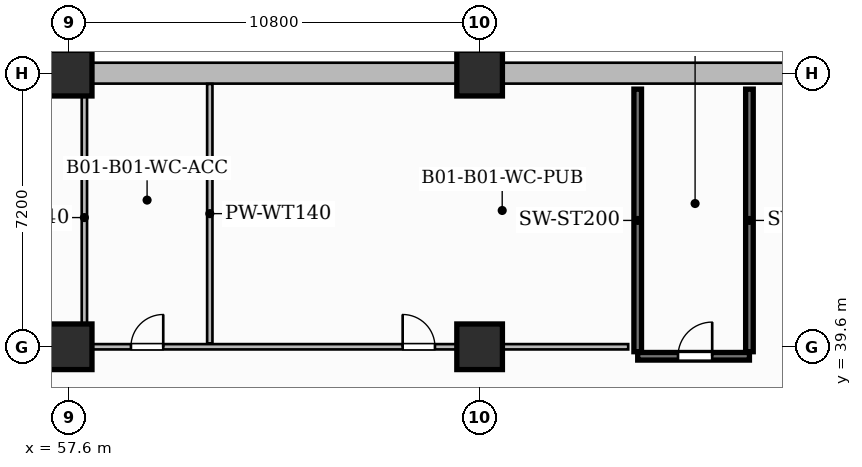
"""IFC4 building model, lengths in metres.
Left out: names, types, materials, properties, quantities, classifications, styles, units other than length and angle.
Written with IfcOpenShell. Run it as: python <this file> out.ifc"""

import sys

from ifc_helpers import new_model, si_unit, direction, frame, frame_2d, origin, origin_2d, place, context, subcontext, project, spatial, rectangle, extrude, source, transform, mapped, element, fill, save


model = new_model("IFC4")
c1 = context("Model", 3, precision=1e-05, world=origin(), true_north=direction((0.0, 1.0)))
c2 = subcontext(c1, "Body", "Model", "MODEL_VIEW")
j1 = project(units=[si_unit("LENGTHUNIT", "METRE"), si_unit("PLANEANGLEUNIT", "RADIAN")], contexts=[c1])
p1 = place(None, origin())
s1 = spatial("IfcSite", under=j1, at=p1, CompositionType="ELEMENT")
p2 = place(p1, origin())
s2 = spatial("IfcBuilding", under=s1, at=p2, CompositionType="ELEMENT")
p3 = place(p2, frame((0.0, 0.0, -6.5)))
s3 = spatial("IfcBuildingStorey", under=s2, at=p3, CompositionType="ELEMENT", Elevation=-6.5)
p4 = place(p3, frame((80.4, 46.8, 0.0), z_axis=(0.0, 0.0, 1.0), x_axis=(-1.0, 0.0, 0.0)))
e1 = element("IfcWall", 1, at=p4, inside=s3, PredefinedType="USERDEFINED", context=c2, shape_type="SweptSolid", body=[
    extrude(rectangle(XDim=85.2, YDim=0.55, at=frame_2d((42.6, 0.0))), origin(), (0.0, 0.0, 1.0), 6.5),
])
m1 = source(origin(), c2, "Body", "SweptSolid", [
    extrude(rectangle(XDim=1.2, YDim=1.2, at=origin_2d()), origin(), (0.0, 0.0, 1.0), 6.5),
])
for number, where, z_axis, x_axis in (
    (2, (57.6, 39.6, 0.0), (0.0, 0.0, 1.0), (1.0, 0.0, 0.0)),
    (3, (57.6, 46.8, 0.0), (0.0, 0.0, 1.0), (1.0, 0.0, 0.0)),
    (4, (68.4, 39.6, 0.0), (0.0, 0.0, 1.0), (1.0, 0.0, 0.0)),
    (5, (68.4, 46.8, 0.0), (0.0, 0.0, 1.0), (1.0, 0.0, 0.0)),
):
    element("IfcColumn", number, at=place(p3, frame(where, z_axis=z_axis, x_axis=x_axis)), inside=s3, PredefinedType="COLUMN", context=c2, shape_type="MappedRepresentation", body=[
        mapped(m1, transform((0.0, 0.0, 0.0), scale=1.0)),
    ])
for number, where, z_axis, x_axis in (
    (6, (72.56, 39.47, 0.0), (0.0, 0.0, 1.0), (0.0, 1.0, 0.0)),
    (7, (75.5, 39.47, 0.0), (0.0, 0.0, 1.0), (0.0, 1.0, 0.0)),
):
    element("IfcWall", number, at=place(p3, frame(where, z_axis=z_axis, x_axis=x_axis)), inside=s3, PredefinedType="SHEAR", context=c2, shape_type="SweptSolid", body=[
        extrude(rectangle(XDim=6.91, YDim=0.2, at=frame_2d((3.455, 0.0))), origin(), (0.0, 0.0, 1.0), 6.5),
    ])
p5 = place(p3, frame((72.56, 39.35, 0.0), z_axis=(0.0, 0.0, 1.0), x_axis=(1.0, 0.0, 0.0)))
e8 = element("IfcWall", 8, at=p5, inside=s3, PredefinedType="SHEAR", context=c2, shape_type="SweptSolid", body=[
    extrude(rectangle(XDim=2.94, YDim=0.2, at=frame_2d((1.47, 0.0))), origin(), (0.0, 0.0, 1.0), 6.5),
])
p6 = place(p5, frame((1.06, 0.0, 0.0)))
e9 = element("IfcOpeningElement", 9, at=p6, cuts=e8, PredefinedType="OPENING", context=c2, shape_type="SweptSolid", body=[
    extrude(rectangle(XDim=0.9, YDim=2.1, at=frame_2d((0.45, 1.05))), frame((0.0, 0.11, 0.0), z_axis=(0.0, -1.0, 0.0), x_axis=(1.0, 0.0, 0.0)), (0.0, 0.0, 1.0), 0.22),
])
p7 = place(p3, frame((58.09, 39.6, 0.0), z_axis=(0.0, 0.0, 1.0), x_axis=(1.0, 0.0, 0.0)))
e10 = element("IfcWall", 10, at=p7, inside=s3, PredefinedType="PARTITIONING", context=c2, shape_type="SweptSolid", body=[
    extrude(rectangle(XDim=14.22, YDim=0.14, at=frame_2d((7.11, 0.0))), origin(), (0.0, 0.0, 1.0), 5.185),
])
p8 = place(p7, frame((1.135, 0.0, 0.0)))
e11 = element("IfcOpeningElement", 11, at=p8, cuts=e10, PredefinedType="OPENING", context=c2, shape_type="SweptSolid", body=[
    extrude(rectangle(XDim=0.85, YDim=2.1, at=frame_2d((0.425, 1.05))), frame((0.0, 0.08, 0.0), z_axis=(0.0, -1.0, 0.0), x_axis=(1.0, 0.0, 0.0)), (0.0, 0.0, 1.0), 0.16),
])
p9 = place(p7, frame((8.285, 0.0, 0.0)))
e12 = element("IfcOpeningElement", 12, at=p9, cuts=e10, PredefinedType="OPENING", context=c2, shape_type="SweptSolid", body=[
    extrude(rectangle(XDim=0.85, YDim=2.1, at=frame_2d((0.425, 1.05))), frame((0.0, 0.08, 0.0), z_axis=(0.0, -1.0, 0.0), x_axis=(1.0, 0.0, 0.0)), (0.0, 0.0, 1.0), 0.16),
])
p10 = place(p3, frame((58.0, 39.69, 0.0), z_axis=(0.0, 0.0, 1.0), x_axis=(0.0, 1.0, 0.0)))
e13 = element("IfcWall", 13, at=p10, inside=s3, PredefinedType="PARTITIONING", context=c2, shape_type="SweptSolid", body=[
    extrude(rectangle(XDim=6.62, YDim=0.14, at=frame_2d((3.31, 0.0))), origin(), (0.0, 0.0, 1.0), 5.185),
])
p11 = place(p3, frame((61.3, 39.69, 0.0), z_axis=(0.0, 0.0, 1.0), x_axis=(0.0, 1.0, 0.0)))
e14 = element("IfcWall", 14, at=p11, inside=s3, PredefinedType="PARTITIONING", context=c2, shape_type="SweptSolid", body=[
    extrude(rectangle(XDim=6.827, YDim=0.14, at=frame_2d((3.414, 0.0))), origin(), (0.0, 0.0, 1.0), 6.1),
])
m2 = source(origin(), c2, "Body", "SweptSolid", [
    extrude(rectangle(XDim=0.9, YDim=2.1, at=frame_2d((0.45, 1.05))), frame((0.0, 0.025, 0.0), z_axis=(0.0, -1.0, 0.0), x_axis=(1.0, 0.0, 0.0)), (0.0, 0.0, 1.0), 0.05),
])
p12 = place(p6, origin())
e15 = element("IfcDoor", 15, at=p12, inside=s3, OperationType="SINGLE_SWING_RIGHT", PredefinedType="DOOR", context=c2, shape_type="MappedRepresentation", body=[
    mapped(m2, transform((0.0, 0.0, 0.0), scale=1.0)),
])
fill(e9, e15)
m3 = source(origin(), c2, "Body", "SweptSolid", [
    extrude(rectangle(XDim=0.85, YDim=2.1, at=frame_2d((0.425, 1.05))), frame((0.0, 0.025, 0.0), z_axis=(0.0, -1.0, 0.0), x_axis=(1.0, 0.0, 0.0)), (0.0, 0.0, 1.0), 0.05),
])
p13 = place(p8, origin())
e16 = element("IfcDoor", 16, at=p13, inside=s3, OperationType="SINGLE_SWING_RIGHT", PredefinedType="DOOR", context=c2, shape_type="MappedRepresentation", body=[
    mapped(m3, transform((0.0, 0.0, 0.0), scale=1.0)),
])
fill(e11, e16)
p14 = place(p9, origin())
e17 = element("IfcDoor", 17, at=p14, inside=s3, OperationType="SINGLE_SWING_LEFT", PredefinedType="DOOR", context=c2, shape_type="MappedRepresentation", body=[
    mapped(m3, transform((0.0, 0.0, 0.0), scale=1.0)),
])
fill(e12, e17)
save(model, sys.argv[1])
